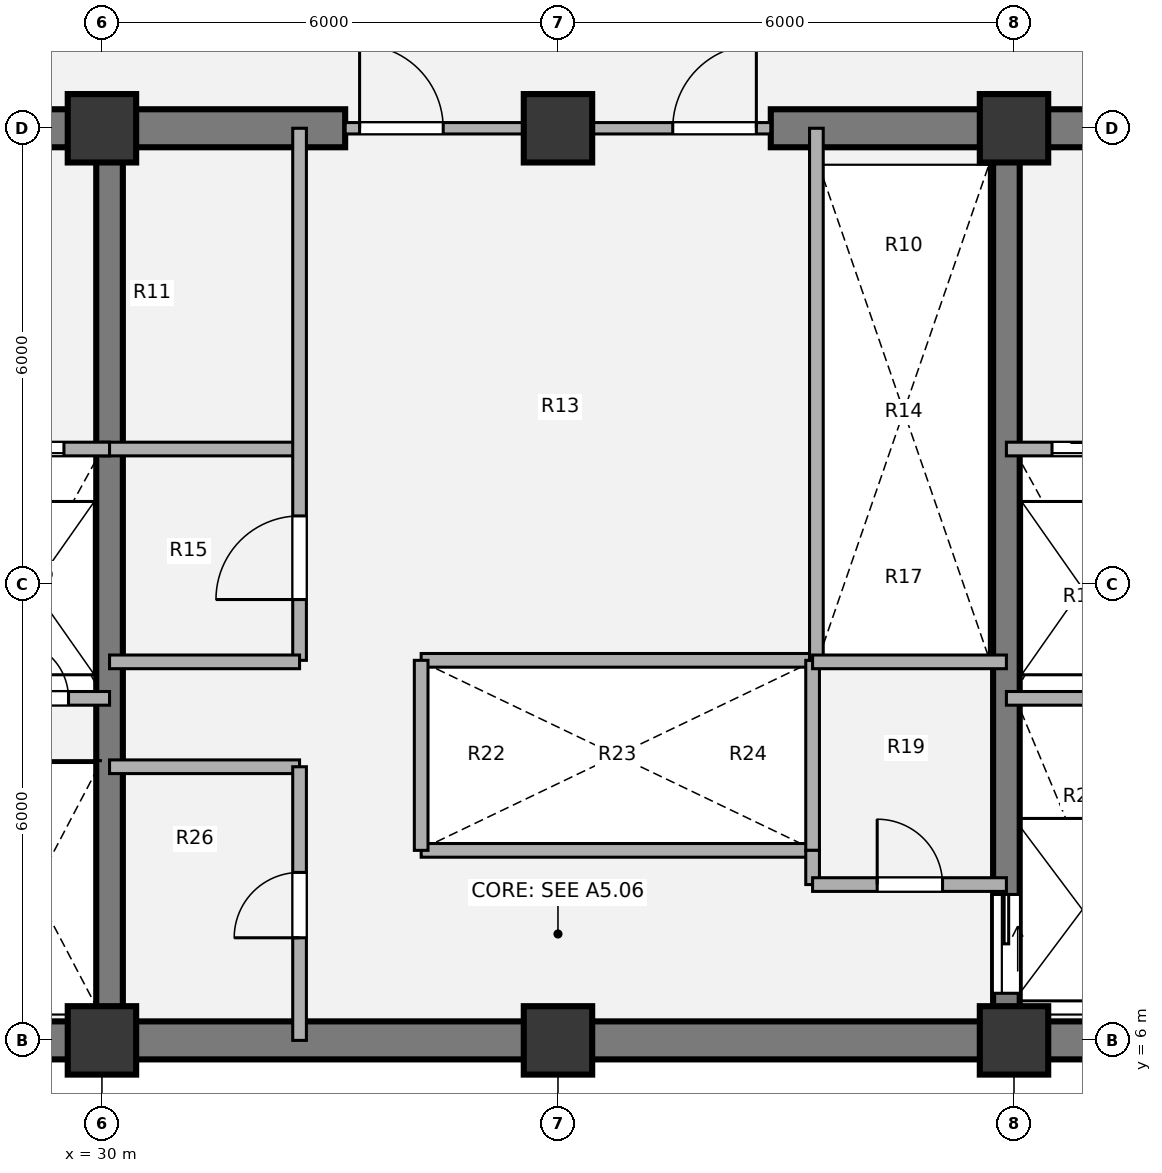
"""IFC4 building model, lengths in metres.
Left out: names, types, materials, properties, quantities, classifications, styles, units other than length and angle.
Written with IfcOpenShell. Run it as: python <this file> out.ifc"""

import sys

from ifc_helpers import new_model, si_unit, direction, frame, frame_2d, origin, origin_2d, place, context, subcontext, project, spatial, rectangle, extrude, source, transform, mapped, element, fill, save


model = new_model("IFC4")
c1 = context("Model", 3, precision=1e-05, world=origin(), true_north=direction((0.0, 1.0)))
c2 = subcontext(c1, "Body", "Model", "MODEL_VIEW")
j1 = project(units=[si_unit("LENGTHUNIT", "METRE"), si_unit("PLANEANGLEUNIT", "RADIAN")], contexts=[c1])
p1 = place(None, origin())
s1 = spatial("IfcSite", under=j1, at=p1, CompositionType="ELEMENT")
p2 = place(p1, origin())
s2 = spatial("IfcBuilding", under=s1, at=p2, CompositionType="ELEMENT")
p3 = place(p2, frame((0.0, 0.0, 146.52)))
s3 = spatial("IfcBuildingStorey", under=s2, at=p3, CompositionType="ELEMENT", Elevation=146.52)
m1 = source(origin(), c2, "Body", "SweptSolid", [
    extrude(rectangle(XDim=0.9, YDim=0.9, at=origin_2d()), origin(), (0.0, 0.0, 1.0), 5.4),
])
for number, where, z_axis, x_axis in (
    (1, (30.0, 6.0, 0.0), (0.0, 0.0, 1.0), (1.0, 0.0, 0.0)),
    (2, (36.0, 6.0, 0.0), (0.0, 0.0, 1.0), (1.0, 0.0, 0.0)),
    (3, (42.0, 6.0, 0.0), (0.0, 0.0, 1.0), (1.0, 0.0, 0.0)),
    (4, (30.0, 18.0, 0.0), (0.0, 0.0, 1.0), (1.0, 0.0, 0.0)),
    (5, (36.0, 18.0, 0.0), (0.0, 0.0, 1.0), (1.0, 0.0, 0.0)),
    (6, (42.0, 18.0, 0.0), (0.0, 0.0, 1.0), (1.0, 0.0, 0.0)),
):
    element("IfcColumn", number, at=place(p3, frame(where, z_axis=z_axis, x_axis=x_axis)), inside=s3, PredefinedType="COLUMN", context=c2, shape_type="MappedRepresentation", body=[
        mapped(m1, transform((0.0, 0.0, 0.0), x_axis=(1.0, 0.0, 0.0), y_axis=(0.0, 1.0, 0.0), z_axis=(0.0, 0.0, 1.0), scale=1.0)),
    ])
p4 = place(p3, frame((48.25, 6.0, 0.0), z_axis=(0.0, 0.0, 1.0), x_axis=(-1.0, 0.0, 0.0)))
e7 = element("IfcWall", 7, at=p4, inside=s3, PredefinedType="SHEAR", context=c2, shape_type="SweptSolid", body=[
    extrude(rectangle(XDim=24.5, YDim=0.5, at=frame_2d((12.25, 0.0))), origin(), (0.0, 0.0, 1.0), 5.4),
])
p5 = place(p3, frame((23.75, 18.0, 0.0), z_axis=(0.0, 0.0, 1.0), x_axis=(1.0, 0.0, 0.0)))
e8 = element("IfcWall", 8, at=p5, inside=s3, PredefinedType="SHEAR", context=c2, shape_type="SweptSolid", body=[
    extrude(rectangle(XDim=9.45, YDim=0.5, at=frame_2d((4.725, 0.0))), origin(), (0.0, 0.0, 1.0), 5.4),
])
p6 = place(p5, frame((1.5, 0.0, 0.0)))
e9 = element("IfcOpeningElement", 9, at=p6, cuts=e8, PredefinedType="OPENING", context=c2, shape_type="SweptSolid", body=[
    extrude(rectangle(XDim=1.1, YDim=2.1, at=origin_2d()), frame((0.55, 0.26, 1.05), z_axis=(0.0, -1.0, 0.0), x_axis=(1.0, 0.0, 0.0)), (0.0, 0.0, 1.0), 0.52),
])
p7 = place(p5, frame((3.5, 0.0, 0.0)))
e10 = element("IfcOpeningElement", 10, at=p7, cuts=e8, PredefinedType="OPENING", context=c2, shape_type="SweptSolid", body=[
    extrude(rectangle(XDim=1.1, YDim=2.1, at=origin_2d()), frame((0.55, 0.26, 1.05), z_axis=(0.0, -1.0, 0.0), x_axis=(1.0, 0.0, 0.0)), (0.0, 0.0, 1.0), 0.52),
])
p8 = place(p3, frame((38.8, 18.0, 0.0), z_axis=(0.0, 0.0, 1.0), x_axis=(1.0, 0.0, 0.0)))
e11 = element("IfcWall", 11, at=p8, inside=s3, PredefinedType="SHEAR", context=c2, shape_type="SweptSolid", body=[
    extrude(rectangle(XDim=9.45, YDim=0.5, at=frame_2d((4.725, 0.0))), origin(), (0.0, 0.0, 1.0), 5.4),
])
p9 = place(p8, frame((4.85, 0.0, 0.0)))
e12 = element("IfcOpeningElement", 12, at=p9, cuts=e11, PredefinedType="OPENING", context=c2, shape_type="SweptSolid", body=[
    extrude(rectangle(XDim=1.1, YDim=2.1, at=origin_2d()), frame((0.55, 0.26, 1.05), z_axis=(0.0, -1.0, 0.0), x_axis=(1.0, 0.0, 0.0)), (0.0, 0.0, 1.0), 0.52),
])
p10 = place(p8, frame((6.85, 0.0, 0.0)))
e13 = element("IfcOpeningElement", 13, at=p10, cuts=e11, PredefinedType="OPENING", context=c2, shape_type="SweptSolid", body=[
    extrude(rectangle(XDim=1.1, YDim=2.1, at=origin_2d()), frame((0.55, 0.26, 1.05), z_axis=(0.0, -1.0, 0.0), x_axis=(1.0, 0.0, 0.0)), (0.0, 0.0, 1.0), 0.52),
])
p11 = place(p3, frame((30.1, 6.0, 0.0), z_axis=(0.0, 0.0, 1.0), x_axis=(0.0, 1.0, 0.0)))
e14 = element("IfcWall", 14, at=p11, inside=s3, PredefinedType="SHEAR", context=c2, shape_type="SweptSolid", body=[
    extrude(rectangle(XDim=12.0, YDim=0.35, at=frame_2d((6.0, 0.0))), origin(), (0.0, 0.0, 1.0), 5.4),
])
p12 = place(p3, frame((41.9, 18.0, 0.0), z_axis=(0.0, 0.0, 1.0), x_axis=(0.0, -1.0, 0.0)))
e15 = element("IfcWall", 15, at=p12, inside=s3, PredefinedType="SHEAR", context=c2, shape_type="SweptSolid", body=[
    extrude(rectangle(XDim=12.0, YDim=0.35, at=frame_2d((6.0, 0.0))), origin(), (0.0, 0.0, 1.0), 5.4),
])
p13 = place(p12, frame((10.08, 0.0, 0.0)))
e16 = element("IfcOpeningElement", 16, at=p13, cuts=e15, PredefinedType="OPENING", context=c2, shape_type="SweptSolid", body=[
    extrude(rectangle(XDim=1.3, YDim=2.1, at=origin_2d()), frame((0.65, 0.185, 1.05), z_axis=(0.0, -1.0, 0.0), x_axis=(1.0, 0.0, 0.0)), (0.0, 0.0, 1.0), 0.37),
])
p14 = place(p3, frame((30.0, 13.78, 0.0), z_axis=(0.0, 0.0, 1.0), x_axis=(1.0, 0.0, 0.0)))
e17 = element("IfcWall", 17, at=p14, inside=s3, PredefinedType="PARTITIONING", context=c2, shape_type="SweptSolid", body=[
    extrude(rectangle(XDim=2.6, YDim=0.18, at=frame_2d((1.3, 0.0))), origin(), (0.0, 0.0, 1.0), 5.05),
])
p15 = place(p3, frame((32.6, 11.0, 0.0), z_axis=(0.0, 0.0, 1.0), x_axis=(0.0, 1.0, 0.0)))
e18 = element("IfcWall", 18, at=p15, inside=s3, PredefinedType="PARTITIONING", context=c2, shape_type="SweptSolid", body=[
    extrude(rectangle(XDim=7.0, YDim=0.18, at=frame_2d((3.5, 0.0))), origin(), (0.0, 0.0, 1.0), 5.05),
])
p16 = place(p15, frame((0.8, 0.0, 0.0)))
e19 = element("IfcOpeningElement", 19, at=p16, cuts=e18, PredefinedType="OPENING", context=c2, shape_type="SweptSolid", body=[
    extrude(rectangle(XDim=1.1, YDim=2.1, at=origin_2d()), frame((0.55, 0.1, 1.05), z_axis=(0.0, -1.0, 0.0), x_axis=(1.0, 0.0, 0.0)), (0.0, 0.0, 1.0), 0.2),
])
for number, where, z_axis, x_axis in (
    (20, (34.2, 11.0, 0.0), (0.0, 0.0, 1.0), (1.0, 0.0, 0.0)),
    (21, (34.2, 8.5, 0.0), (0.0, 0.0, 1.0), (1.0, 0.0, 0.0)),
):
    element("IfcWall", number, at=place(p3, frame(where, z_axis=z_axis, x_axis=x_axis)), inside=s3, PredefinedType="PARTITIONING", context=c2, shape_type="SweptSolid", body=[
        extrude(rectangle(XDim=5.15, YDim=0.18, at=frame_2d((2.575, 0.0))), origin(), (0.0, 0.0, 1.0), 5.05),
    ])
for number, where, z_axis, x_axis in (
    (22, (34.2, 8.5, 0.0), (0.0, 0.0, 1.0), (0.0, 1.0, 0.0)),
    (23, (39.35, 8.5, 0.0), (0.0, 0.0, 1.0), (0.0, 1.0, 0.0)),
):
    element("IfcWall", number, at=place(p3, frame(where, z_axis=z_axis, x_axis=x_axis)), inside=s3, PredefinedType="PARTITIONING", context=c2, shape_type="SweptSolid", body=[
        extrude(rectangle(XDim=2.5, YDim=0.18, at=frame_2d((1.25, 0.0))), origin(), (0.0, 0.0, 1.0), 5.05),
    ])
p17 = place(p3, frame((39.4, 11.0, 0.0), z_axis=(0.0, 0.0, 1.0), x_axis=(0.0, 1.0, 0.0)))
e24 = element("IfcWall", 24, at=p17, inside=s3, PredefinedType="PARTITIONING", context=c2, shape_type="SweptSolid", body=[
    extrude(rectangle(XDim=7.0, YDim=0.18, at=frame_2d((3.5, 0.0))), origin(), (0.0, 0.0, 1.0), 5.05),
])
for number, where, z_axis, x_axis in (
    (25, (30.1, 10.98, 0.0), (0.0, 0.0, 1.0), (1.0, 0.0, 0.0)),
    (26, (30.1, 9.6, 0.0), (0.0, 0.0, 1.0), (1.0, 0.0, 0.0)),
):
    element("IfcWall", number, at=place(p3, frame(where, z_axis=z_axis, x_axis=x_axis)), inside=s3, PredefinedType="PARTITIONING", context=c2, shape_type="SweptSolid", body=[
        extrude(rectangle(XDim=2.5, YDim=0.18, at=frame_2d((1.25, 0.0))), origin(), (0.0, 0.0, 1.0), 5.05),
    ])
p18 = place(p3, frame((32.6, 6.0, 0.0), z_axis=(0.0, 0.0, 1.0), x_axis=(0.0, 1.0, 0.0)))
e27 = element("IfcWall", 27, at=p18, inside=s3, PredefinedType="PARTITIONING", context=c2, shape_type="SweptSolid", body=[
    extrude(rectangle(XDim=3.6, YDim=0.18, at=frame_2d((1.8, 0.0))), origin(), (0.0, 0.0, 1.0), 5.05),
])
p19 = place(p18, frame((1.35, 0.0, 0.0)))
e28 = element("IfcOpeningElement", 28, at=p19, cuts=e27, PredefinedType="OPENING", context=c2, shape_type="SweptSolid", body=[
    extrude(rectangle(XDim=0.86, YDim=2.1, at=origin_2d()), frame((0.43, 0.1, 1.05), z_axis=(0.0, -1.0, 0.0), x_axis=(1.0, 0.0, 0.0)), (0.0, 0.0, 1.0), 0.2),
])
p20 = place(p3, frame((39.35, 10.98, 0.0), z_axis=(0.0, 0.0, 1.0), x_axis=(1.0, 0.0, 0.0)))
e29 = element("IfcWall", 29, at=p20, inside=s3, PredefinedType="PARTITIONING", context=c2, shape_type="SweptSolid", body=[
    extrude(rectangle(XDim=2.55, YDim=0.18, at=frame_2d((1.275, 0.0))), origin(), (0.0, 0.0, 1.0), 5.05),
])
p21 = place(p3, frame((39.35, 8.05, 0.0), z_axis=(0.0, 0.0, 1.0), x_axis=(0.0, 1.0, 0.0)))
e30 = element("IfcWall", 30, at=p21, inside=s3, PredefinedType="PARTITIONING", context=c2, shape_type="SweptSolid", body=[
    extrude(rectangle(XDim=0.45, YDim=0.18, at=frame_2d((0.225, 0.0))), origin(), (0.0, 0.0, 1.0), 5.05),
])
p22 = place(p3, frame((39.35, 8.05, 0.0), z_axis=(0.0, 0.0, 1.0), x_axis=(1.0, 0.0, 0.0)))
e31 = element("IfcWall", 31, at=p22, inside=s3, PredefinedType="PARTITIONING", context=c2, shape_type="SweptSolid", body=[
    extrude(rectangle(XDim=2.55, YDim=0.18, at=frame_2d((1.275, 0.0))), origin(), (0.0, 0.0, 1.0), 5.05),
])
p23 = place(p22, frame((0.85, 0.0, 0.0)))
e32 = element("IfcOpeningElement", 32, at=p23, cuts=e31, PredefinedType="OPENING", context=c2, shape_type="SweptSolid", body=[
    extrude(rectangle(XDim=0.86, YDim=2.1, at=origin_2d()), frame((0.43, 0.1, 1.05), z_axis=(0.0, -1.0, 0.0), x_axis=(1.0, 0.0, 0.0)), (0.0, 0.0, 1.0), 0.2),
])
p24 = place(p3, frame((33.2, 18.0, 0.0), z_axis=(0.0, 0.0, 1.0), x_axis=(1.0, 0.0, 0.0)))
e33 = element("IfcWall", 33, at=p24, inside=s3, PredefinedType="PARTITIONING", context=c2, shape_type="SweptSolid", body=[
    extrude(rectangle(XDim=5.6, YDim=0.15, at=frame_2d((2.8, 0.0))), origin(), (0.0, 0.0, 1.0), 3.865),
])
p25 = place(p24, frame((0.19, 0.0, 0.0)))
e34 = element("IfcOpeningElement", 34, at=p25, cuts=e33, PredefinedType="OPENING", context=c2, shape_type="SweptSolid", body=[
    extrude(rectangle(XDim=1.1, YDim=2.1, at=origin_2d()), frame((0.55, 0.085, 1.05), z_axis=(0.0, -1.0, 0.0), x_axis=(1.0, 0.0, 0.0)), (0.0, 0.0, 1.0), 0.17),
])
p26 = place(p24, frame((4.31, 0.0, 0.0)))
e35 = element("IfcOpeningElement", 35, at=p26, cuts=e33, PredefinedType="OPENING", context=c2, shape_type="SweptSolid", body=[
    extrude(rectangle(XDim=1.1, YDim=2.1, at=origin_2d()), frame((0.55, 0.085, 1.05), z_axis=(0.0, -1.0, 0.0), x_axis=(1.0, 0.0, 0.0)), (0.0, 0.0, 1.0), 0.17),
])
p27 = place(p3, frame((24.0, 13.78, 0.0), z_axis=(0.0, 0.0, 1.0), x_axis=(1.0, 0.0, 0.0)))
e36 = element("IfcWall", 36, at=p27, inside=s3, PredefinedType="PARTITIONING", context=c2, shape_type="SweptSolid", body=[
    extrude(rectangle(XDim=6.1, YDim=0.18, at=frame_2d((3.05, 0.0))), origin(), (0.0, 0.0, 1.0), 2.229),
])
p28 = place(p27, frame((1.15, 0.0, 0.0)))
e37 = element("IfcOpeningElement", 37, at=p28, cuts=e36, PredefinedType="OPENING", context=c2, shape_type="SweptSolid", body=[
    extrude(rectangle(XDim=1.1, YDim=2.1, at=origin_2d()), frame((0.55, 0.1, 1.05), z_axis=(0.0, -1.0, 0.0), x_axis=(1.0, 0.0, 0.0)), (0.0, 0.0, 1.0), 0.2),
])
p29 = place(p27, frame((4.4, 0.0, 0.0)))
e38 = element("IfcOpeningElement", 38, at=p29, cuts=e36, PredefinedType="OPENING", context=c2, shape_type="SweptSolid", body=[
    extrude(rectangle(XDim=1.1, YDim=2.1, at=origin_2d()), frame((0.55, 0.1, 1.05), z_axis=(0.0, -1.0, 0.0), x_axis=(1.0, 0.0, 0.0)), (0.0, 0.0, 1.0), 0.2),
])
p30 = place(p3, frame((28.15, 10.5, 0.0), z_axis=(0.0, 0.0, 1.0), x_axis=(1.0, 0.0, 0.0)))
e39 = element("IfcWall", 39, at=p30, inside=s3, PredefinedType="PARTITIONING", context=c2, shape_type="SweptSolid", body=[
    extrude(rectangle(XDim=1.95, YDim=0.18, at=frame_2d((0.975, 0.0))), origin(), (0.0, 0.0, 1.0), 5.05),
])
p31 = place(p30, frame((0.65, 0.0, 0.0)))
e40 = element("IfcOpeningElement", 40, at=p31, cuts=e39, PredefinedType="OPENING", context=c2, shape_type="SweptSolid", body=[
    extrude(rectangle(XDim=0.76, YDim=2.05, at=origin_2d()), frame((0.38, 0.1, 1.025), z_axis=(0.0, -1.0, 0.0), x_axis=(1.0, 0.0, 0.0)), (0.0, 0.0, 1.0), 0.2),
])
p32 = place(p3, frame((41.9, 13.78, 0.0), z_axis=(0.0, 0.0, 1.0), x_axis=(1.0, 0.0, 0.0)))
e41 = element("IfcWall", 41, at=p32, inside=s3, PredefinedType="PARTITIONING", context=c2, shape_type="SweptSolid", body=[
    extrude(rectangle(XDim=6.1, YDim=0.18, at=frame_2d((3.05, 0.0))), origin(), (0.0, 0.0, 1.0), 2.229),
])
p33 = place(p32, frame((0.6, 0.0, 0.0)))
e42 = element("IfcOpeningElement", 42, at=p33, cuts=e41, PredefinedType="OPENING", context=c2, shape_type="SweptSolid", body=[
    extrude(rectangle(XDim=1.1, YDim=2.1, at=origin_2d()), frame((0.55, 0.1, 1.05), z_axis=(0.0, -1.0, 0.0), x_axis=(1.0, 0.0, 0.0)), (0.0, 0.0, 1.0), 0.2),
])
p34 = place(p32, frame((3.8, 0.0, 0.0)))
e43 = element("IfcOpeningElement", 43, at=p34, cuts=e41, PredefinedType="OPENING", context=c2, shape_type="SweptSolid", body=[
    extrude(rectangle(XDim=1.1, YDim=2.1, at=origin_2d()), frame((0.55, 0.1, 1.05), z_axis=(0.0, -1.0, 0.0), x_axis=(1.0, 0.0, 0.0)), (0.0, 0.0, 1.0), 0.2),
])
p35 = place(p3, frame((41.9, 10.5, 0.0), z_axis=(0.0, 0.0, 1.0), x_axis=(1.0, 0.0, 0.0)))
e44 = element("IfcWall", 44, at=p35, inside=s3, PredefinedType="PARTITIONING", context=c2, shape_type="SweptSolid", body=[
    extrude(rectangle(XDim=1.95, YDim=0.18, at=frame_2d((0.975, 0.0))), origin(), (0.0, 0.0, 1.0), 5.05),
])
m2 = source(origin(), c2, "Body", "SweptSolid", [
    extrude(rectangle(XDim=1.1, YDim=2.1, at=origin_2d()), frame((0.55, 0.025, 1.05), z_axis=(0.0, -1.0, 0.0), x_axis=(1.0, 0.0, 0.0)), (0.0, 0.0, 1.0), 0.05),
])
p36 = place(p16, origin())
e45 = element("IfcDoor", 45, at=p36, inside=s3, OperationType="SINGLE_SWING_LEFT", PredefinedType="DOOR", context=c2, shape_type="MappedRepresentation", body=[
    mapped(m2, transform((0.0, 0.0, 0.0), x_axis=(1.0, 0.0, 0.0), y_axis=(0.0, 1.0, 0.0), z_axis=(0.0, 0.0, 1.0), scale=1.0)),
])
fill(e19, e45)
m3 = source(origin(), c2, "Body", "SweptSolid", [
    extrude(rectangle(XDim=0.86, YDim=2.1, at=origin_2d()), frame((0.43, 0.025, 1.05), z_axis=(0.0, -1.0, 0.0), x_axis=(1.0, 0.0, 0.0)), (0.0, 0.0, 1.0), 0.05),
])
p37 = place(p19, origin())
e46 = element("IfcDoor", 46, at=p37, inside=s3, OperationType="SINGLE_SWING_LEFT", PredefinedType="DOOR", context=c2, shape_type="MappedRepresentation", body=[
    mapped(m3, transform((0.0, 0.0, 0.0), x_axis=(1.0, 0.0, 0.0), y_axis=(0.0, 1.0, 0.0), z_axis=(0.0, 0.0, 1.0), scale=1.0)),
])
fill(e28, e46)
p38 = place(p23, origin())
e47 = element("IfcDoor", 47, at=p38, inside=s3, OperationType="SINGLE_SWING_LEFT", PredefinedType="DOOR", context=c2, shape_type="MappedRepresentation", body=[
    mapped(m3, transform((0.0, 0.0, 0.0), x_axis=(1.0, 0.0, 0.0), y_axis=(0.0, 1.0, 0.0), z_axis=(0.0, 0.0, 1.0), scale=1.0)),
])
fill(e32, e47)
m4 = source(origin(), c2, "Body", "SweptSolid", [
    extrude(rectangle(XDim=1.1, YDim=2.1, at=origin_2d()), frame((0.55, 0.025, 1.05), z_axis=(0.0, -1.0, 0.0), x_axis=(1.0, 0.0, 0.0)), (0.0, 0.0, 1.0), 0.05),
])
p39 = place(p25, origin())
e48 = element("IfcDoor", 48, at=p39, inside=s3, OperationType="SINGLE_SWING_LEFT", PredefinedType="DOOR", context=c2, shape_type="MappedRepresentation", body=[
    mapped(m4, transform((0.0, 0.0, 0.0), x_axis=(1.0, 0.0, 0.0), y_axis=(0.0, 1.0, 0.0), z_axis=(0.0, 0.0, 1.0), scale=1.0)),
])
fill(e34, e48)
p40 = place(p26, origin())
e49 = element("IfcDoor", 49, at=p40, inside=s3, OperationType="SINGLE_SWING_RIGHT", PredefinedType="DOOR", context=c2, shape_type="MappedRepresentation", body=[
    mapped(m4, transform((0.0, 0.0, 0.0), x_axis=(1.0, 0.0, 0.0), y_axis=(0.0, 1.0, 0.0), z_axis=(0.0, 0.0, 1.0), scale=1.0)),
])
fill(e35, e49)
m5 = source(origin(), c2, "Body", "SweptSolid", [
    extrude(rectangle(XDim=1.1, YDim=2.1, at=origin_2d()), frame((0.55, 0.025, 1.05), z_axis=(0.0, -1.0, 0.0), x_axis=(1.0, 0.0, 0.0)), (0.0, 0.0, 1.0), 0.05),
])
p41 = place(p29, origin())
e50 = element("IfcDoor", 50, at=p41, inside=s3, OperationType="SLIDING_TO_LEFT", PredefinedType="DOOR", context=c2, shape_type="MappedRepresentation", body=[
    mapped(m5, transform((0.0, 0.0, 0.0), x_axis=(1.0, 0.0, 0.0), y_axis=(0.0, 1.0, 0.0), z_axis=(0.0, 0.0, 1.0), scale=1.0)),
])
fill(e38, e50)
m6 = source(origin(), c2, "Body", "SweptSolid", [
    extrude(rectangle(XDim=0.76, YDim=2.05, at=origin_2d()), frame((0.38, 0.025, 1.025), z_axis=(0.0, -1.0, 0.0), x_axis=(1.0, 0.0, 0.0)), (0.0, 0.0, 1.0), 0.05),
])
p42 = place(p31, origin())
e51 = element("IfcDoor", 51, at=p42, inside=s3, OperationType="SINGLE_SWING_LEFT", PredefinedType="DOOR", context=c2, shape_type="MappedRepresentation", body=[
    mapped(m6, transform((0.0, 0.0, 0.0), x_axis=(1.0, 0.0, 0.0), y_axis=(0.0, 1.0, 0.0), z_axis=(0.0, 0.0, 1.0), scale=1.0)),
])
fill(e40, e51)
p43 = place(p33, origin())
e52 = element("IfcDoor", 52, at=p43, inside=s3, OperationType="SLIDING_TO_RIGHT", PredefinedType="DOOR", context=c2, shape_type="MappedRepresentation", body=[
    mapped(m5, transform((0.0, 0.0, 0.0), x_axis=(1.0, 0.0, 0.0), y_axis=(0.0, 1.0, 0.0), z_axis=(0.0, 0.0, 1.0), scale=1.0)),
])
fill(e42, e52)
m7 = source(origin(), c2, "Body", "SweptSolid", [
    extrude(rectangle(XDim=1.3, YDim=2.1, at=origin_2d()), frame((0.65, 0.025, 1.05), z_axis=(0.0, -1.0, 0.0), x_axis=(1.0, 0.0, 0.0)), (0.0, 0.0, 1.0), 0.05),
])
p44 = place(p13, origin())
e53 = element("IfcDoor", 53, at=p44, inside=s3, OperationType="SLIDING_TO_LEFT", PredefinedType="DOOR", context=c2, shape_type="MappedRepresentation", body=[
    mapped(m7, transform((0.0, 0.0, 0.0), x_axis=(1.0, 0.0, 0.0), y_axis=(0.0, 1.0, 0.0), z_axis=(0.0, 0.0, 1.0), scale=1.0)),
])
fill(e16, e53)
save(model, sys.argv[1])
